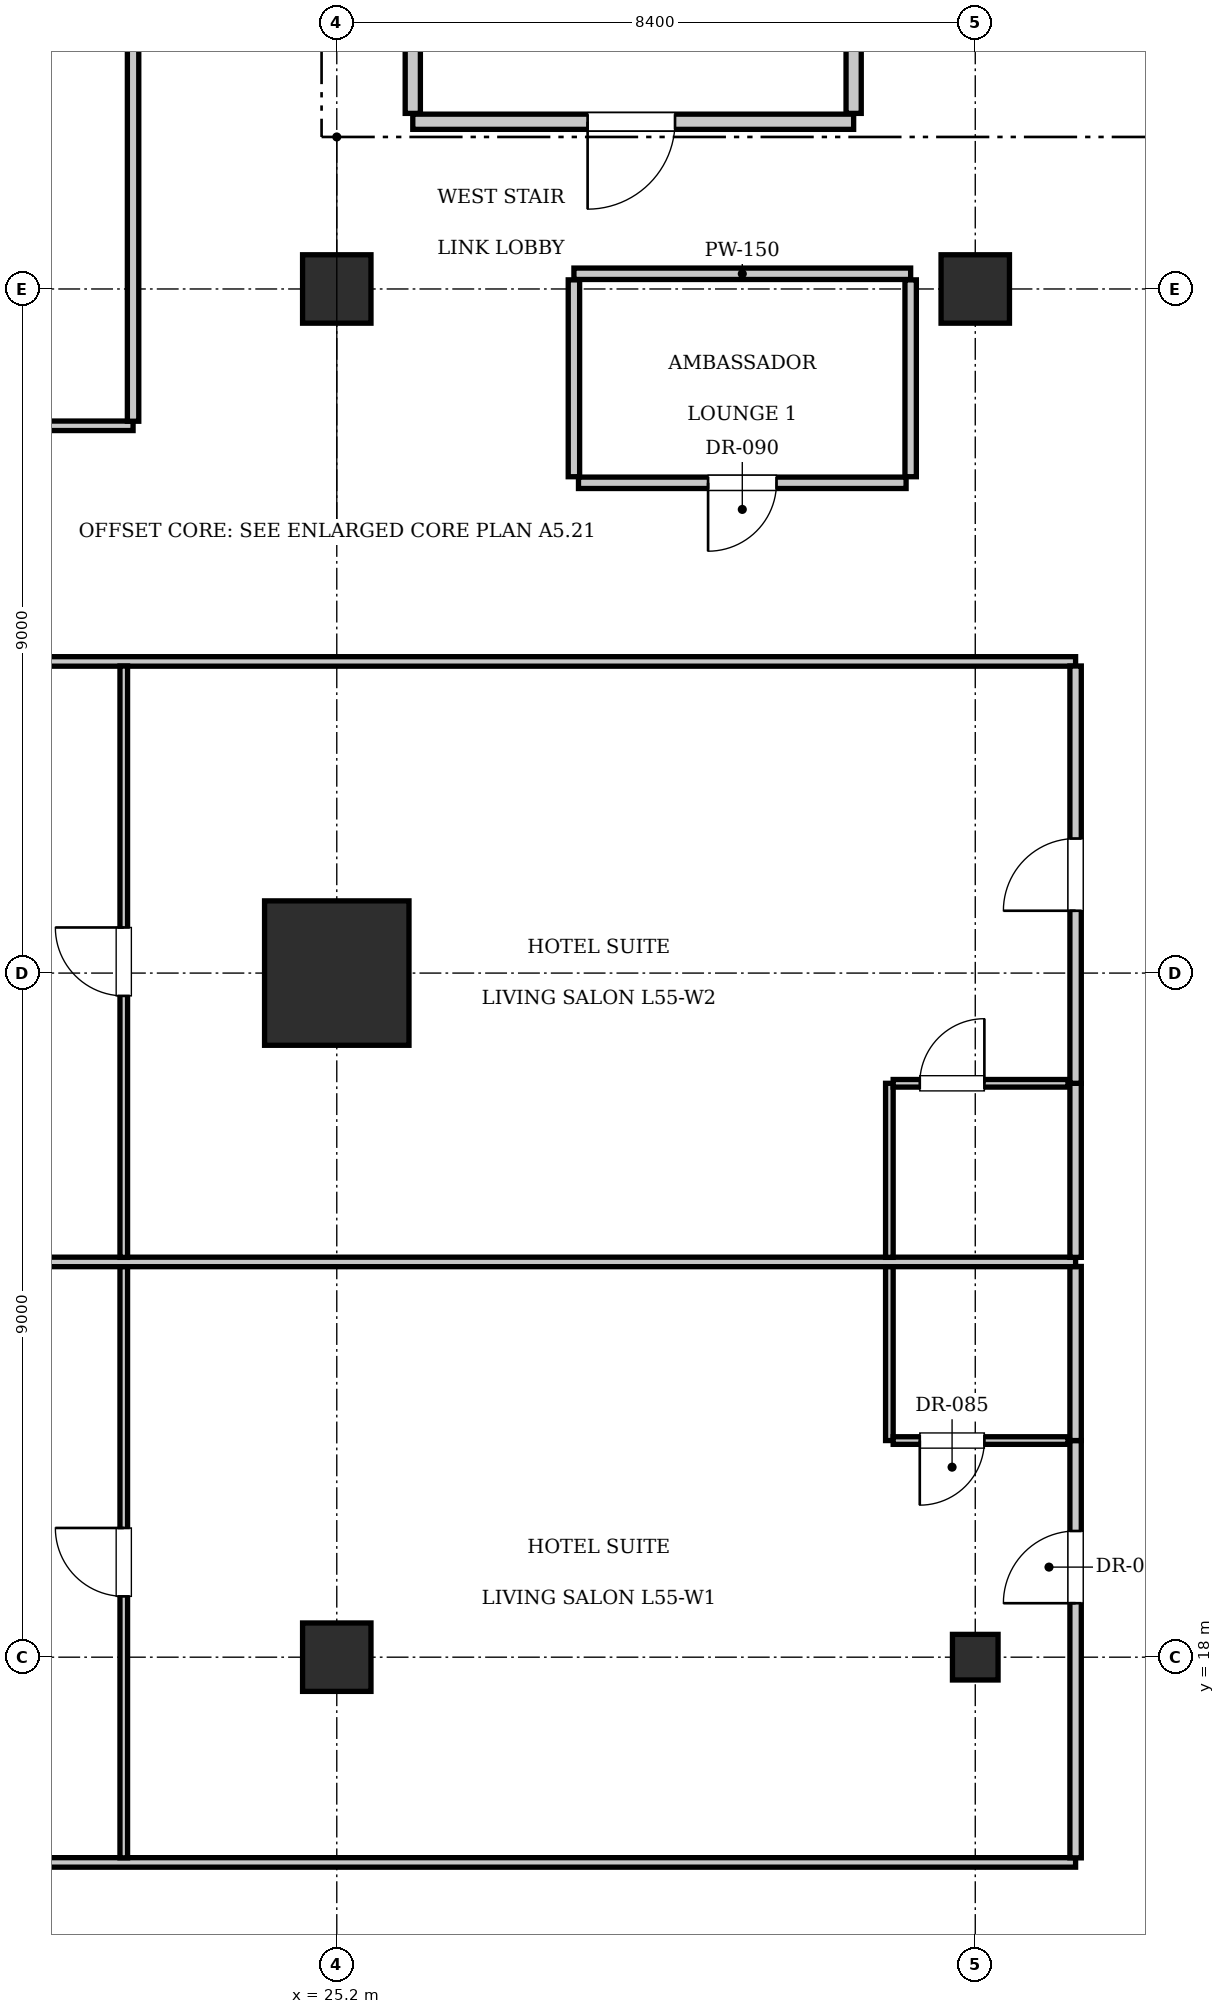
"""IFC4 building model, lengths in metres.
Left out: names, types, materials, properties, quantities, classifications, styles, units other than length and angle.
Written with IfcOpenShell. Run it as: python <this file> out.ifc"""

import sys

from ifc_helpers import new_model, si_unit, direction, frame, frame_2d, origin, origin_2d, place, context, subcontext, project, spatial, rectangle, i_section, extrude, element, fill, save


model = new_model("IFC4")
c1 = context("Model", 3, precision=1e-05, world=origin(), true_north=direction((0.0, 1.0)))
c2 = subcontext(c1, "Body", "Model", "MODEL_VIEW")
j1 = project(units=[si_unit("LENGTHUNIT", "METRE"), si_unit("PLANEANGLEUNIT", "RADIAN")], contexts=[c1])
p1 = place(None, origin())
s1 = spatial("IfcSite", under=j1, at=p1, CompositionType="ELEMENT")
p2 = place(p1, origin())
s2 = spatial("IfcBuilding", under=s1, at=p2, CompositionType="ELEMENT")
p3 = place(p2, frame((0.0, 0.0, 223.65)))
s3 = spatial("IfcBuildingStorey", under=s2, at=p3, CompositionType="ELEMENT", Elevation=223.65)
p4 = place(p3, frame((25.2, 27.0, 0.0), z_axis=(0.0, 0.0, 1.0), x_axis=(1.0, 0.0, 0.0)))
e1 = element("IfcColumn", 1, at=p4, inside=s3, PredefinedType="COLUMN", context=c2, shape_type="SweptSolid", body=[
    extrude(rectangle(XDim=1.9, YDim=1.9, at=origin_2d()), origin(), (0.0, 0.0, 1.0), 3.85),
])
for number, where, z_axis, x_axis in (
    (2, (25.2, 36.0, 0.0), (0.0, 0.0, 1.0), (1.0, 0.0, 0.0)),
    (3, (33.6, 36.0, 0.0), (0.0, 0.0, 1.0), (1.0, 0.0, 0.0)),
    (4, (25.2, 18.0, 0.0), (0.0, 0.0, 1.0), (1.0, 0.0, 0.0)),
):
    element("IfcColumn", number, at=place(p3, frame(where, z_axis=z_axis, x_axis=x_axis)), inside=s3, PredefinedType="COLUMN", context=c2, shape_type="SweptSolid", body=[
        extrude(rectangle(XDim=0.9, YDim=0.9, at=origin_2d()), origin(), (0.0, 0.0, 1.0), 3.85),
    ])
p5 = place(p3, frame((33.6, 18.0, 0.0), z_axis=(0.0, 0.0, 1.0), x_axis=(1.0, 0.0, 0.0)))
e5 = element("IfcColumn", 5, at=p5, inside=s3, PredefinedType="COLUMN", context=c2, shape_type="SweptSolid", body=[
    extrude(i_section(OverallWidth=0.6, OverallDepth=0.6, WebThickness=0.025, FlangeThickness=0.038, at=origin_2d()), origin(), (0.0, 0.0, 1.0), 3.85),
])
p6 = place(p3, frame((26.2, 38.2, 0.0), z_axis=(0.0, 0.0, 1.0), x_axis=(1.0, 0.0, 0.0)))
e6 = element("IfcWall", 6, at=p6, inside=s3, PredefinedType="PARTITIONING", context=c2, shape_type="SweptSolid", body=[
    extrude(rectangle(XDim=5.8, YDim=0.2, at=frame_2d((2.9, 0.0))), origin(), (0.0, 0.0, 1.0), 3.55),
])
p7 = place(p6, frame((2.3, 0.0, 0.0)))
e7 = element("IfcOpeningElement", 7, at=p7, cuts=e6, PredefinedType="OPENING", context=c2, shape_type="SweptSolid", body=[
    extrude(rectangle(XDim=1.15, YDim=2.15, at=frame_2d((0.575, 1.075))), frame((0.0, 0.11, 0.0), z_axis=(0.0, -1.0, 0.0), x_axis=(1.0, 0.0, 0.0)), (0.0, 0.0, 1.0), 0.22),
])
for number, where, z_axis, x_axis in (
    (8, (26.2, 38.31, 0.0), (0.0, 0.0, 1.0), (0.0, 1.0, 0.0)),
    (9, (32.0, 38.31, 0.0), (0.0, 0.0, 1.0), (0.0, 1.0, 0.0)),
):
    element("IfcWall", number, at=place(p3, frame(where, z_axis=z_axis, x_axis=x_axis)), inside=s3, PredefinedType="PARTITIONING", context=c2, shape_type="SweptSolid", body=[
        extrude(rectangle(XDim=3.07, YDim=0.2, at=frame_2d((1.535, 0.0))), origin(), (0.0, 0.0, 1.0), 3.55),
    ])
p8 = place(p3, frame((28.32, 36.2, 0.0), z_axis=(0.0, 0.0, 1.0), x_axis=(1.0, 0.0, 0.0)))
e10 = element("IfcWall", 10, at=p8, inside=s3, PredefinedType="PARTITIONING", context=c2, shape_type="SweptSolid", body=[
    extrude(rectangle(XDim=4.43, YDim=0.15, at=frame_2d((2.215, 0.0))), origin(), (0.0, 0.0, 1.0), 3.55),
])
for number, where, z_axis, x_axis in (
    (11, (28.32, 33.53, 0.0), (0.0, 0.0, 1.0), (0.0, 1.0, 0.0)),
    (12, (32.75, 33.53, 0.0), (0.0, 0.0, 1.0), (0.0, 1.0, 0.0)),
):
    element("IfcWall", number, at=place(p3, frame(where, z_axis=z_axis, x_axis=x_axis)), inside=s3, PredefinedType="PARTITIONING", context=c2, shape_type="SweptSolid", body=[
        extrude(rectangle(XDim=2.59, YDim=0.15, at=frame_2d((1.295, 0.0))), origin(), (0.0, 0.0, 1.0), 3.55),
    ])
p9 = place(p3, frame((28.38, 33.45, 0.0), z_axis=(0.0, 0.0, 1.0), x_axis=(1.0, 0.0, 0.0)))
e13 = element("IfcWall", 13, at=p9, inside=s3, PredefinedType="PARTITIONING", context=c2, shape_type="SweptSolid", body=[
    extrude(rectangle(XDim=4.31, YDim=0.15, at=frame_2d((2.155, 0.0))), origin(), (0.0, 0.0, 1.0), 3.55),
])
p10 = place(p9, frame((1.705, 0.0, 0.0)))
e14 = element("IfcOpeningElement", 14, at=p10, cuts=e13, PredefinedType="OPENING", context=c2, shape_type="SweptSolid", body=[
    extrude(rectangle(XDim=0.9, YDim=2.1, at=frame_2d((0.45, 1.05))), frame((0.0, 0.085, 0.0), z_axis=(0.0, -1.0, 0.0), x_axis=(1.0, 0.0, 0.0)), (0.0, 0.0, 1.0), 0.17),
])
for number, where, z_axis, x_axis in (
    (15, (13.2, 15.3, 0.0), (0.0, 0.0, 1.0), (1.0, 0.0, 0.0)),
    (16, (13.2, 31.1, 0.0), (0.0, 0.0, 1.0), (1.0, 0.0, 0.0)),
):
    element("IfcWall", number, at=place(p3, frame(where, z_axis=z_axis, x_axis=x_axis)), inside=s3, PredefinedType="PARTITIONING", context=c2, shape_type="SweptSolid", body=[
        extrude(rectangle(XDim=21.72, YDim=0.125, at=frame_2d((10.86, 0.0))), origin(), (0.0, 0.0, 1.0), 3.55),
    ])
p11 = place(p3, frame((34.92, 15.36, 0.0), z_axis=(0.0, 0.0, 1.0), x_axis=(0.0, 1.0, 0.0)))
e17 = element("IfcWall", 17, at=p11, inside=s3, PredefinedType="PARTITIONING", context=c2, shape_type="SweptSolid", body=[
    extrude(rectangle(XDim=5.49, YDim=0.15, at=frame_2d((2.745, 0.0))), origin(), (0.0, 0.0, 1.0), 3.55),
])
p12 = place(p11, frame((3.35, 0.0, 0.0)))
e18 = element("IfcOpeningElement", 18, at=p12, cuts=e17, PredefinedType="OPENING", context=c2, shape_type="SweptSolid", body=[
    extrude(rectangle(XDim=0.95, YDim=2.15, at=frame_2d((0.475, 1.075))), frame((0.0, 0.085, 0.0), z_axis=(0.0, -1.0, 0.0), x_axis=(1.0, 0.0, 0.0)), (0.0, 0.0, 1.0), 0.17),
])
p13 = place(p3, frame((34.92, 20.85, 0.0), z_axis=(0.0, 0.0, 1.0), x_axis=(0.0, 1.0, 0.0)))
e19 = element("IfcWall", 19, at=p13, inside=s3, PredefinedType="PARTITIONING", context=c2, shape_type="SweptSolid", body=[
    extrude(rectangle(XDim=2.29, YDim=0.15, at=frame_2d((1.145, 0.0))), origin(), (0.0, 0.0, 1.0), 3.55),
])
p14 = place(p3, frame((32.47, 20.85, 0.0), z_axis=(0.0, 0.0, 1.0), x_axis=(0.0, 1.0, 0.0)))
e20 = element("IfcWall", 20, at=p14, inside=s3, PredefinedType="PARTITIONING", context=c2, shape_type="SweptSolid", body=[
    extrude(rectangle(XDim=2.29, YDim=0.1, at=frame_2d((1.145, 0.0))), origin(), (0.0, 0.0, 1.0), 3.55),
])
p15 = place(p3, frame((32.52, 20.85, 0.0), z_axis=(0.0, 0.0, 1.0), x_axis=(1.0, 0.0, 0.0)))
e21 = element("IfcWall", 21, at=p15, inside=s3, PredefinedType="PARTITIONING", context=c2, shape_type="SweptSolid", body=[
    extrude(rectangle(XDim=2.3, YDim=0.1, at=frame_2d((1.15, 0.0))), origin(), (0.0, 0.0, 1.0), 3.55),
])
p16 = place(p15, frame((0.35, 0.0, 0.0)))
e22 = element("IfcOpeningElement", 22, at=p16, cuts=e21, PredefinedType="OPENING", context=c2, shape_type="SweptSolid", body=[
    extrude(rectangle(XDim=0.85, YDim=2.1, at=frame_2d((0.425, 1.05))), frame((0.0, 0.06, 0.0), z_axis=(0.0, -1.0, 0.0), x_axis=(1.0, 0.0, 0.0)), (0.0, 0.0, 1.0), 0.12),
])
p17 = place(p3, frame((22.398, 15.36, 0.0), z_axis=(0.0, 0.0, 1.0), x_axis=(0.0, 1.0, 0.0)))
e23 = element("IfcWall", 23, at=p17, inside=s3, PredefinedType="PARTITIONING", context=c2, shape_type="SweptSolid", body=[
    extrude(rectangle(XDim=7.78, YDim=0.1, at=frame_2d((3.89, 0.0))), origin(), (0.0, 0.0, 1.0), 3.55),
])
p18 = place(p17, frame((3.44, 0.0, 0.0)))
e24 = element("IfcOpeningElement", 24, at=p18, cuts=e23, PredefinedType="OPENING", context=c2, shape_type="SweptSolid", body=[
    extrude(rectangle(XDim=0.9, YDim=2.1, at=frame_2d((0.45, 1.05))), frame((0.0, 0.06, 0.0), z_axis=(0.0, -1.0, 0.0), x_axis=(1.0, 0.0, 0.0)), (0.0, 0.0, 1.0), 0.12),
])
p19 = place(p3, frame((13.2, 23.2, 0.0), z_axis=(0.0, 0.0, 1.0), x_axis=(1.0, 0.0, 0.0)))
e25 = element("IfcWall", 25, at=p19, inside=s3, PredefinedType="PARTITIONING", context=c2, shape_type="SweptSolid", body=[
    extrude(rectangle(XDim=21.72, YDim=0.125, at=frame_2d((10.86, 0.0))), origin(), (0.0, 0.0, 1.0), 3.55),
])
p20 = place(p3, frame((34.92, 23.26, 0.0), z_axis=(0.0, 0.0, 1.0), x_axis=(0.0, 1.0, 0.0)))
e26 = element("IfcWall", 26, at=p20, inside=s3, PredefinedType="PARTITIONING", context=c2, shape_type="SweptSolid", body=[
    extrude(rectangle(XDim=2.29, YDim=0.15, at=frame_2d((1.145, 0.0))), origin(), (0.0, 0.0, 1.0), 3.55),
])
p21 = place(p3, frame((34.92, 25.55, 0.0), z_axis=(0.0, 0.0, 1.0), x_axis=(0.0, 1.0, 0.0)))
e27 = element("IfcWall", 27, at=p21, inside=s3, PredefinedType="PARTITIONING", context=c2, shape_type="SweptSolid", body=[
    extrude(rectangle(XDim=5.49, YDim=0.15, at=frame_2d((2.745, 0.0))), origin(), (0.0, 0.0, 1.0), 3.55),
])
p22 = place(p21, frame((2.27, 0.0, 0.0)))
e28 = element("IfcOpeningElement", 28, at=p22, cuts=e27, PredefinedType="OPENING", context=c2, shape_type="SweptSolid", body=[
    extrude(rectangle(XDim=0.95, YDim=2.15, at=frame_2d((0.475, 1.075))), frame((0.0, 0.085, 0.0), z_axis=(0.0, -1.0, 0.0), x_axis=(1.0, 0.0, 0.0)), (0.0, 0.0, 1.0), 0.17),
])
p23 = place(p3, frame((32.47, 23.26, 0.0), z_axis=(0.0, 0.0, 1.0), x_axis=(0.0, 1.0, 0.0)))
e29 = element("IfcWall", 29, at=p23, inside=s3, PredefinedType="PARTITIONING", context=c2, shape_type="SweptSolid", body=[
    extrude(rectangle(XDim=2.29, YDim=0.1, at=frame_2d((1.145, 0.0))), origin(), (0.0, 0.0, 1.0), 3.55),
])
p24 = place(p3, frame((32.52, 25.55, 0.0), z_axis=(0.0, 0.0, 1.0), x_axis=(1.0, 0.0, 0.0)))
e30 = element("IfcWall", 30, at=p24, inside=s3, PredefinedType="PARTITIONING", context=c2, shape_type="SweptSolid", body=[
    extrude(rectangle(XDim=2.3, YDim=0.1, at=frame_2d((1.15, 0.0))), origin(), (0.0, 0.0, 1.0), 3.55),
])
p25 = place(p24, frame((0.35, 0.0, 0.0)))
e31 = element("IfcOpeningElement", 31, at=p25, cuts=e30, PredefinedType="OPENING", context=c2, shape_type="SweptSolid", body=[
    extrude(rectangle(XDim=0.85, YDim=2.1, at=frame_2d((0.425, 1.05))), frame((0.0, 0.06, 0.0), z_axis=(0.0, -1.0, 0.0), x_axis=(1.0, 0.0, 0.0)), (0.0, 0.0, 1.0), 0.12),
])
p26 = place(p3, frame((22.398, 23.26, 0.0), z_axis=(0.0, 0.0, 1.0), x_axis=(0.0, 1.0, 0.0)))
e32 = element("IfcWall", 32, at=p26, inside=s3, PredefinedType="PARTITIONING", context=c2, shape_type="SweptSolid", body=[
    extrude(rectangle(XDim=7.78, YDim=0.1, at=frame_2d((3.89, 0.0))), origin(), (0.0, 0.0, 1.0), 3.55),
])
p27 = place(p26, frame((3.44, 0.0, 0.0)))
e33 = element("IfcOpeningElement", 33, at=p27, cuts=e32, PredefinedType="OPENING", context=c2, shape_type="SweptSolid", body=[
    extrude(rectangle(XDim=0.9, YDim=2.1, at=frame_2d((0.45, 1.05))), frame((0.0, 0.06, 0.0), z_axis=(0.0, -1.0, 0.0), x_axis=(1.0, 0.0, 0.0)), (0.0, 0.0, 1.0), 0.12),
])
p28 = place(p3, frame((13.2, 34.2, 0.0), z_axis=(0.0, 0.0, 1.0), x_axis=(1.0, 0.0, 0.0)))
e34 = element("IfcWall", 34, at=p28, inside=s3, PredefinedType="PARTITIONING", context=c2, shape_type="SweptSolid", body=[
    extrude(rectangle(XDim=9.32, YDim=0.125, at=frame_2d((4.66, 0.0))), origin(), (0.0, 0.0, 1.0), 3.55),
])
p29 = place(p3, frame((22.52, 34.26, 0.0), z_axis=(0.0, 0.0, 1.0), x_axis=(0.0, 1.0, 0.0)))
e35 = element("IfcWall", 35, at=p29, inside=s3, PredefinedType="PARTITIONING", context=c2, shape_type="SweptSolid", body=[
    extrude(rectangle(XDim=12.927, YDim=0.15, at=frame_2d((6.464, 0.0))), origin(), (0.0, 0.0, 1.0), 3.55),
])
p30 = place(p29, frame((5.989, 0.0, 0.0)))
e36 = element("IfcOpeningElement", 36, at=p30, cuts=e35, PredefinedType="OPENING", context=c2, shape_type="SweptSolid", body=[
    extrude(rectangle(XDim=0.95, YDim=2.15, at=frame_2d((0.475, 1.075))), frame((0.0, 0.085, 0.0), z_axis=(0.0, -1.0, 0.0), x_axis=(1.0, 0.0, 0.0)), (0.0, 0.0, 1.0), 0.17),
])
p31 = place(p7, frame((1.15, 0.0, 0.0), z_axis=(0.0, 0.0, 1.0), x_axis=(-1.0, 0.0, 0.0)))
e37 = element("IfcDoor", 37, at=p31, inside=s3, OperationType="SINGLE_SWING_RIGHT", PredefinedType="DOOR", context=c2, shape_type="SweptSolid", body=[
    extrude(rectangle(XDim=1.15, YDim=2.15, at=frame_2d((0.575, 1.075))), frame((0.0, 0.025, 0.0), z_axis=(0.0, -1.0, 0.0), x_axis=(1.0, 0.0, 0.0)), (0.0, 0.0, 1.0), 0.05),
])
fill(e7, e37)
p32 = place(p10, frame((0.9, 0.0, 0.0), z_axis=(0.0, 0.0, 1.0), x_axis=(-1.0, 0.0, 0.0)))
e38 = element("IfcDoor", 38, at=p32, inside=s3, OperationType="SINGLE_SWING_RIGHT", PredefinedType="DOOR", context=c2, shape_type="SweptSolid", body=[
    extrude(rectangle(XDim=0.9, YDim=2.1, at=frame_2d((0.45, 1.05))), frame((0.0, 0.025, 0.0), z_axis=(0.0, -1.0, 0.0), x_axis=(1.0, 0.0, 0.0)), (0.0, 0.0, 1.0), 0.05),
])
fill(e14, e38)
p33 = place(p16, frame((0.85, 0.0, 0.0), z_axis=(0.0, 0.0, 1.0), x_axis=(-1.0, 0.0, 0.0)))
e39 = element("IfcDoor", 39, at=p33, inside=s3, OperationType="SINGLE_SWING_RIGHT", PredefinedType="DOOR", context=c2, shape_type="SweptSolid", body=[
    extrude(rectangle(XDim=0.85, YDim=2.1, at=frame_2d((0.425, 1.05))), frame((0.0, 0.025, 0.0), z_axis=(0.0, -1.0, 0.0), x_axis=(1.0, 0.0, 0.0)), (0.0, 0.0, 1.0), 0.05),
])
fill(e22, e39)
p34 = place(p12, origin())
e40 = element("IfcDoor", 40, at=p34, inside=s3, OperationType="SINGLE_SWING_LEFT", PredefinedType="DOOR", context=c2, shape_type="SweptSolid", body=[
    extrude(rectangle(XDim=0.95, YDim=2.15, at=frame_2d((0.475, 1.075))), frame((0.0, 0.025, 0.0), z_axis=(0.0, -1.0, 0.0), x_axis=(1.0, 0.0, 0.0)), (0.0, 0.0, 1.0), 0.05),
])
fill(e18, e40)
p35 = place(p18, origin())
e41 = element("IfcDoor", 41, at=p35, inside=s3, OperationType="SINGLE_SWING_RIGHT", PredefinedType="DOOR", context=c2, shape_type="SweptSolid", body=[
    extrude(rectangle(XDim=0.9, YDim=2.1, at=frame_2d((0.45, 1.05))), frame((0.0, 0.025, 0.0), z_axis=(0.0, -1.0, 0.0), x_axis=(1.0, 0.0, 0.0)), (0.0, 0.0, 1.0), 0.05),
])
fill(e24, e41)
p36 = place(p25, origin())
e42 = element("IfcDoor", 42, at=p36, inside=s3, OperationType="SINGLE_SWING_RIGHT", PredefinedType="DOOR", context=c2, shape_type="SweptSolid", body=[
    extrude(rectangle(XDim=0.85, YDim=2.1, at=frame_2d((0.425, 1.05))), frame((0.0, 0.025, 0.0), z_axis=(0.0, -1.0, 0.0), x_axis=(1.0, 0.0, 0.0)), (0.0, 0.0, 1.0), 0.05),
])
fill(e31, e42)
p37 = place(p22, origin())
e43 = element("IfcDoor", 43, at=p37, inside=s3, OperationType="SINGLE_SWING_LEFT", PredefinedType="DOOR", context=c2, shape_type="SweptSolid", body=[
    extrude(rectangle(XDim=0.95, YDim=2.15, at=frame_2d((0.475, 1.075))), frame((0.0, 0.025, 0.0), z_axis=(0.0, -1.0, 0.0), x_axis=(1.0, 0.0, 0.0)), (0.0, 0.0, 1.0), 0.05),
])
fill(e28, e43)
p38 = place(p27, origin())
e44 = element("IfcDoor", 44, at=p38, inside=s3, OperationType="SINGLE_SWING_RIGHT", PredefinedType="DOOR", context=c2, shape_type="SweptSolid", body=[
    extrude(rectangle(XDim=0.9, YDim=2.1, at=frame_2d((0.45, 1.05))), frame((0.0, 0.025, 0.0), z_axis=(0.0, -1.0, 0.0), x_axis=(1.0, 0.0, 0.0)), (0.0, 0.0, 1.0), 0.05),
])
fill(e33, e44)
save(model, sys.argv[1])
